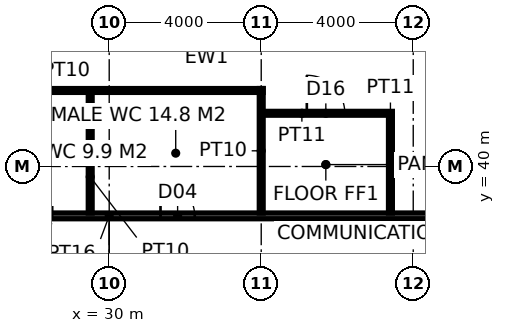
"""IFC4 building model, lengths in metres.
Left out: names, types, materials, properties, quantities, classifications, styles, units other than length and angle.
Written with IfcOpenShell. Run it as: python <this file> out.ifc"""

import sys

from ifc_helpers import new_model, si_unit, direction, frame, frame_2d, origin, place, context, subcontext, project, spatial, rectangle, extrude, element, fill, save


model = new_model("IFC4")
c1 = context("Model", 3, precision=1e-05, world=origin(), true_north=direction((0.0, 1.0)))
c2 = subcontext(c1, "Body", "Model", "MODEL_VIEW")
j1 = project(units=[si_unit("LENGTHUNIT", "METRE"), si_unit("PLANEANGLEUNIT", "RADIAN")], contexts=[c1])
p1 = place(None, origin())
s1 = spatial("IfcSite", under=j1, at=p1, CompositionType="ELEMENT")
p2 = place(p1, origin())
s2 = spatial("IfcBuilding", under=s1, at=p2, CompositionType="ELEMENT")
p3 = place(p2, frame((0.0, 0.0, 19.0)))
s3 = spatial("IfcBuildingStorey", under=s2, at=p3, CompositionType="ELEMENT", Elevation=19.0)
p4 = place(p3, frame((15.775, 38.7, 0.0), z_axis=(0.0, 0.0, 1.0), x_axis=(1.0, 0.0, 0.0)))
e1 = element("IfcWall", 1, at=p4, inside=s3, PredefinedType="PARTITIONING", context=c2, shape_type="SweptSolid", body=[
    extrude(rectangle(XDim=28.45, YDim=0.15, at=frame_2d((14.225, 0.0))), origin(), (0.0, 0.0, 1.0), 3.85),
])
p5 = place(p4, frame((7.975, 0.0, 0.0)))
e2 = element("IfcOpeningElement", 2, at=p5, cuts=e1, PredefinedType="OPENING", context=c2, shape_type="SweptSolid", body=[
    extrude(rectangle(XDim=0.9, YDim=2.1, at=frame_2d((0.45, 1.05))), frame((0.0, 0.085, 0.0), z_axis=(0.0, -1.0, 0.0), x_axis=(1.0, 0.0, 0.0)), (0.0, 0.0, 1.0), 0.17),
])
p6 = place(p4, frame((11.725, 0.0, 0.0)))
e3 = element("IfcOpeningElement", 3, at=p6, cuts=e1, PredefinedType="OPENING", context=c2, shape_type="SweptSolid", body=[
    extrude(rectangle(XDim=1.0, YDim=2.1, at=frame_2d((0.5, 1.05))), frame((0.0, 0.085, 0.0), z_axis=(0.0, -1.0, 0.0), x_axis=(1.0, 0.0, 0.0)), (0.0, 0.0, 1.0), 0.17),
])
p7 = place(p4, frame((15.575, 0.0, 0.0)))
e4 = element("IfcOpeningElement", 4, at=p7, cuts=e1, PredefinedType="OPENING", context=c2, shape_type="SweptSolid", body=[
    extrude(rectangle(XDim=0.9, YDim=2.1, at=frame_2d((0.45, 1.05))), frame((0.0, 0.085, 0.0), z_axis=(0.0, -1.0, 0.0), x_axis=(1.0, 0.0, 0.0)), (0.0, 0.0, 1.0), 0.17),
])
p8 = place(p3, frame((34.0, 38.775, 0.0), z_axis=(0.0, 0.0, 1.0), x_axis=(0.0, 1.0, 0.0)))
e5 = element("IfcWall", 5, at=p8, inside=s3, PredefinedType="PARTITIONING", context=c2, shape_type="SweptSolid", body=[
    extrude(rectangle(XDim=3.275, YDim=0.1, at=frame_2d((1.638, 0.0))), origin(), (0.0, 0.0, 1.0), 2.95),
])
p9 = place(p3, frame((21.95, 42.0, 0.0), z_axis=(0.0, 0.0, 1.0), x_axis=(1.0, 0.0, 0.0)))
e6 = element("IfcWall", 6, at=p9, inside=s3, PredefinedType="PARTITIONING", context=c2, shape_type="SweptSolid", body=[
    extrude(rectangle(XDim=12.1, YDim=0.1, at=frame_2d((6.05, 0.0))), origin(), (0.0, 0.0, 1.0), 3.85),
])
p10 = place(p3, frame((29.5, 38.775, 0.0), z_axis=(0.0, 0.0, 1.0), x_axis=(0.0, 1.0, 0.0)))
e7 = element("IfcWall", 7, at=p10, inside=s3, PredefinedType="PARTITIONING", context=c2, shape_type="SweptSolid", body=[
    extrude(rectangle(XDim=3.175, YDim=0.1, at=frame_2d((1.587, 0.0))), origin(), (0.0, 0.0, 1.0), 3.85),
])
p11 = place(p3, frame((34.05, 41.4, 0.0), z_axis=(0.0, 0.0, 1.0), x_axis=(1.0, 0.0, 0.0)))
e8 = element("IfcWall", 8, at=p11, inside=s3, PredefinedType="PARTITIONING", context=c2, shape_type="SweptSolid", body=[
    extrude(rectangle(XDim=3.4, YDim=0.1, at=frame_2d((1.7, 0.0))), origin(), (0.0, 0.0, 1.0), 3.85),
])
p12 = place(p11, frame((1.15, 0.0, 0.0)))
e9 = element("IfcOpeningElement", 9, at=p12, cuts=e8, PredefinedType="OPENING", context=c2, shape_type="SweptSolid", body=[
    extrude(rectangle(XDim=1.0, YDim=2.2, at=frame_2d((0.5, 1.1))), frame((0.0, 0.06, 0.0), z_axis=(0.0, -1.0, 0.0), x_axis=(1.0, 0.0, 0.0)), (0.0, 0.0, 1.0), 0.12),
])
p13 = place(p3, frame((37.4, 38.775, 0.0), z_axis=(0.0, 0.0, 1.0), x_axis=(0.0, 1.0, 0.0)))
e10 = element("IfcWall", 10, at=p13, inside=s3, PredefinedType="PARTITIONING", context=c2, shape_type="SweptSolid", body=[
    extrude(rectangle(XDim=2.575, YDim=0.1, at=frame_2d((1.288, 0.0))), origin(), (0.0, 0.0, 1.0), 3.85),
])
p14 = place(p7, origin())
e11 = element("IfcDoor", 11, at=p14, inside=s3, OperationType="SINGLE_SWING_LEFT", PredefinedType="DOOR", context=c2, shape_type="SweptSolid", body=[
    extrude(rectangle(XDim=0.9, YDim=2.1, at=frame_2d((0.45, 1.05))), frame((0.0, 0.025, 0.0), z_axis=(0.0, -1.0, 0.0), x_axis=(1.0, 0.0, 0.0)), (0.0, 0.0, 1.0), 0.05),
])
fill(e4, e11)
p15 = place(p12, origin())
e12 = element("IfcDoor", 12, at=p15, inside=s3, OperationType="SINGLE_SWING_LEFT", PredefinedType="DOOR", context=c2, shape_type="SweptSolid", body=[
    extrude(rectangle(XDim=1.0, YDim=2.2, at=frame_2d((0.5, 1.1))), frame((0.0, 0.025, 0.0), z_axis=(0.0, -1.0, 0.0), x_axis=(1.0, 0.0, 0.0)), (0.0, 0.0, 1.0), 0.05),
])
fill(e9, e12)
save(model, sys.argv[1])
